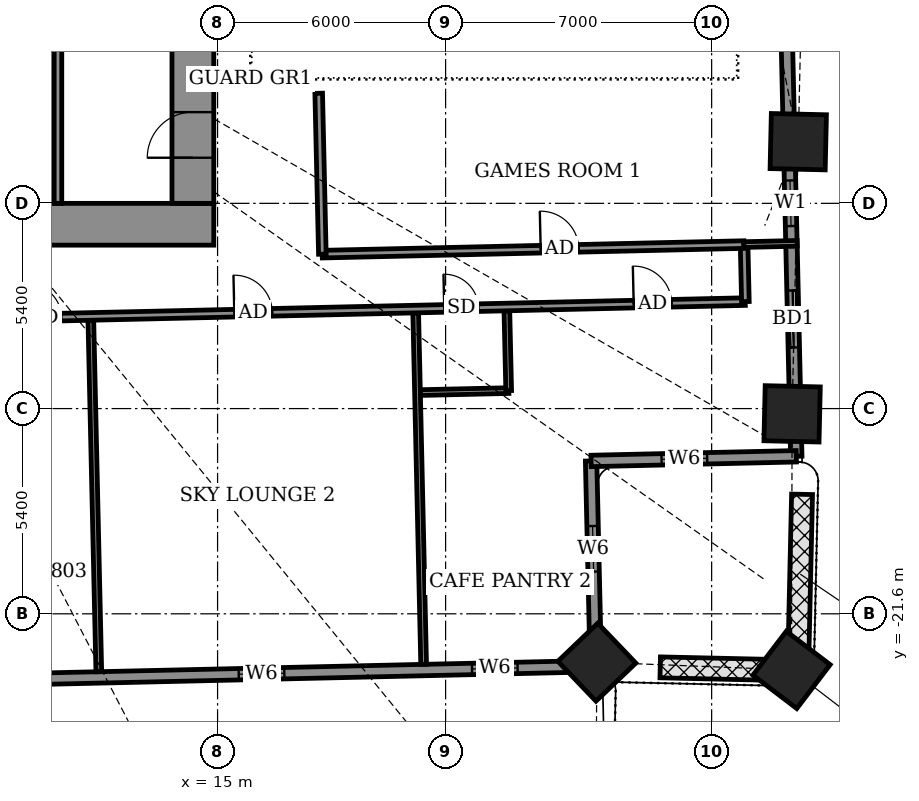
"""IFC4 building model, lengths in metres.
Left out: names, types, materials, properties, quantities, classifications, styles, units other than length and angle.
Written with IfcOpenShell. Run it as: python <this file> out.ifc"""

import sys

from ifc_helpers import new_model, si_unit, direction, frame, frame_2d, origin, origin_2d, place, context, subcontext, project, spatial, rectangle, extrude, element, fill, save


model = new_model("IFC4")
c1 = context("Model", 3, precision=1e-05, world=origin(), true_north=direction((0.0, 1.0)))
c2 = subcontext(c1, "Body", "Model", "MODEL_VIEW")
j1 = project(units=[si_unit("LENGTHUNIT", "METRE"), si_unit("PLANEANGLEUNIT", "RADIAN")], contexts=[c1])
p1 = place(None, origin())
s1 = spatial("IfcSite", under=j1, at=p1, CompositionType="ELEMENT")
p2 = place(p1, origin())
s2 = spatial("IfcBuilding", under=s1, at=p2, CompositionType="ELEMENT")
p3 = place(p2, frame((0.0, 0.0, 74.7)))
s3 = spatial("IfcBuildingStorey", under=s2, at=p3, CompositionType="ELEMENT", Elevation=74.7)
for number, where, z_axis, x_axis in (
    (1, (24.98, -22.873, -0.55), (0.0, 0.0, 1.0), (0.723, 0.691, 0.0)),
    (2, (30.102, -23.076, -0.55), (0.0, 0.0, 1.0), (0.606, 0.796, 0.0)),
    (3, (30.117, -16.339, -0.55), (0.0, 0.0, 1.0), (0.023, 1.0, 0.0)),
    (4, (30.279, -9.177, -0.55), (0.0, 0.0, 1.0), (0.023, 1.0, 0.0)),
):
    element("IfcColumn", number, at=place(p3, frame(where, z_axis=z_axis, x_axis=x_axis)), inside=s3, PredefinedType="COLUMN", context=c2, shape_type="SweptSolid", body=[
        extrude(rectangle(XDim=1.45, YDim=1.45, at=origin_2d()), origin(), (0.0, 0.0, 1.0), 4.6),
    ])
p4 = place(p3, frame((30.227, -17.455, 0.0), z_axis=(0.0, 0.0, 1.0), x_axis=(-0.022734702163, 0.999741533256, 0.0)))
e5 = element("IfcWall", 5, at=p4, inside=s3, PredefinedType="SOLIDWALL", context=c2, shape_type="SweptSolid", body=[
    extrude(rectangle(XDim=12.929, YDim=0.3, at=frame_2d((6.465, 0.0))), origin(), (0.0, 0.0, 1.0), 2.45),
])
p5 = place(p4, frame((2.863, 0.0, 0.0)))
e6 = element("IfcOpeningElement", 6, at=p5, cuts=e5, PredefinedType="OPENING", context=c2, shape_type="SweptSolid", body=[
    extrude(rectangle(XDim=1.5, YDim=2.4, at=frame_2d((0.75, 1.2))), frame((0.0, 0.16, 0.0), z_axis=(0.0, -1.0, 0.0), x_axis=(1.0, 0.0, 0.0)), (0.0, 0.0, 1.0), 0.32),
])
p6 = place(p4, frame((6.059, 0.0, 0.9)))
e7 = element("IfcOpeningElement", 7, at=p6, cuts=e5, PredefinedType="OPENING", context=c2, shape_type="SweptSolid", body=[
    extrude(rectangle(XDim=1.2, YDim=1.5, at=frame_2d((0.6, 0.75))), frame((0.0, 0.16, 0.0), z_axis=(0.0, -1.0, 0.0), x_axis=(1.0, 0.0, 0.0)), (0.0, 0.0, 1.0), 0.32),
])
p7 = place(p3, frame((-21.409, -24.029, 0.0), z_axis=(0.0, 0.0, 1.0), x_axis=(0.999742634032, 0.022686244721, 0.0)))
e8 = element("IfcWall", 8, at=p7, inside=s3, PredefinedType="SOLIDWALL", context=c2, shape_type="SweptSolid", body=[
    extrude(rectangle(XDim=46.372, YDim=0.3, at=frame_2d((23.186, 0.0))), origin(), (0.0, 0.0, 1.0), 2.1),
])
p8 = place(p7, frame((3.25, 0.0, 0.0)))
e9 = element("IfcOpeningElement", 9, at=p8, cuts=e8, PredefinedType="OPENING", context=c2, shape_type="SweptSolid", body=[
    extrude(rectangle(XDim=1.5, YDim=2.0, at=frame_2d((0.75, 1.0))), frame((0.0, 0.16, 0.0), z_axis=(0.0, -1.0, 0.0), x_axis=(1.0, 0.0, 0.0)), (0.0, 0.0, 1.0), 0.32),
])
p9 = place(p7, frame((10.575, 0.0, 0.5)))
e10 = element("IfcOpeningElement", 10, at=p9, cuts=e8, PredefinedType="OPENING", context=c2, shape_type="SweptSolid", body=[
    extrude(rectangle(XDim=1.2, YDim=1.1, at=frame_2d((0.6, 0.55))), frame((0.0, 0.16, 0.0), z_axis=(0.0, -1.0, 0.0), x_axis=(1.0, 0.0, 0.0)), (0.0, 0.0, 1.0), 0.32),
])
p10 = place(p7, frame((15.95, 0.0, 0.5)))
e11 = element("IfcOpeningElement", 11, at=p10, cuts=e8, PredefinedType="OPENING", context=c2, shape_type="SweptSolid", body=[
    extrude(rectangle(XDim=1.2, YDim=1.1, at=frame_2d((0.6, 0.55))), frame((0.0, 0.16, 0.0), z_axis=(0.0, -1.0, 0.0), x_axis=(1.0, 0.0, 0.0)), (0.0, 0.0, 1.0), 0.32),
])
p11 = place(p7, frame((20.575, 0.0, 0.0)))
e12 = element("IfcOpeningElement", 12, at=p11, cuts=e8, PredefinedType="OPENING", context=c2, shape_type="SweptSolid", body=[
    extrude(rectangle(XDim=1.5, YDim=2.0, at=frame_2d((0.75, 1.0))), frame((0.0, 0.16, 0.0), z_axis=(0.0, -1.0, 0.0), x_axis=(1.0, 0.0, 0.0)), (0.0, 0.0, 1.0), 0.32),
])
p12 = place(p7, frame((25.35, 0.0, 0.0)))
e13 = element("IfcOpeningElement", 13, at=p12, cuts=e8, PredefinedType="OPENING", context=c2, shape_type="SweptSolid", body=[
    extrude(rectangle(XDim=1.5, YDim=2.0, at=frame_2d((0.75, 1.0))), frame((0.0, 0.16, 0.0), z_axis=(0.0, -1.0, 0.0), x_axis=(1.0, 0.0, 0.0)), (0.0, 0.0, 1.0), 0.32),
])
p13 = place(p7, frame((30.125, 0.0, 0.0)))
e14 = element("IfcOpeningElement", 14, at=p13, cuts=e8, PredefinedType="OPENING", context=c2, shape_type="SweptSolid", body=[
    extrude(rectangle(XDim=1.5, YDim=2.0, at=frame_2d((0.75, 1.0))), frame((0.0, 0.16, 0.0), z_axis=(0.0, -1.0, 0.0), x_axis=(1.0, 0.0, 0.0)), (0.0, 0.0, 1.0), 0.32),
])
p14 = place(p7, frame((36.975, 0.0, 0.5)))
e15 = element("IfcOpeningElement", 15, at=p14, cuts=e8, PredefinedType="OPENING", context=c2, shape_type="SweptSolid", body=[
    extrude(rectangle(XDim=1.2, YDim=1.1, at=frame_2d((0.6, 0.55))), frame((0.0, 0.16, 0.0), z_axis=(0.0, -1.0, 0.0), x_axis=(1.0, 0.0, 0.0)), (0.0, 0.0, 1.0), 0.32),
])
p15 = place(p7, frame((43.115, 0.0, 0.5)))
e16 = element("IfcOpeningElement", 16, at=p15, cuts=e8, PredefinedType="OPENING", context=c2, shape_type="SweptSolid", body=[
    extrude(rectangle(XDim=1.2, YDim=1.1, at=frame_2d((0.6, 0.55))), frame((0.0, 0.16, 0.0), z_axis=(0.0, -1.0, 0.0), x_axis=(1.0, 0.0, 0.0)), (0.0, 0.0, 1.0), 0.32),
])
p16 = place(p3, frame((24.951, -22.977, 0.0), z_axis=(0.0, 0.0, 1.0), x_axis=(-0.022784045517, 0.999740409941, 0.0)))
e17 = element("IfcWall", 17, at=p16, inside=s3, PredefinedType="SOLIDWALL", context=c2, shape_type="SweptSolid", body=[
    extrude(rectangle(XDim=5.401, YDim=0.3, at=frame_2d((2.7, 0.0))), origin(), (0.0, 0.0, 1.0), 2.25),
])
p17 = place(p16, frame((2.488, 0.0, 0.5)))
e18 = element("IfcOpeningElement", 18, at=p17, cuts=e17, PredefinedType="OPENING", context=c2, shape_type="SweptSolid", body=[
    extrude(rectangle(XDim=1.2, YDim=1.1, at=frame_2d((0.6, 0.55))), frame((0.0, 0.16, 0.0), z_axis=(0.0, -1.0, 0.0), x_axis=(1.0, 0.0, 0.0)), (0.0, 0.0, 1.0), 0.32),
])
p18 = place(p3, frame((24.828, -17.578, 0.0), z_axis=(0.0, 0.0, 1.0), x_axis=(0.99974143864, 0.022738862475, 0.0)))
e19 = element("IfcWall", 19, at=p18, inside=s3, PredefinedType="SOLIDWALL", context=c2, shape_type="SweptSolid", body=[
    extrude(rectangle(XDim=5.401, YDim=0.3, at=frame_2d((2.7, 0.0))), origin(), (0.0, 0.0, 1.0), 2.25),
])
p19 = place(p18, frame((1.855, 0.0, 0.5)))
e20 = element("IfcOpeningElement", 20, at=p19, cuts=e19, PredefinedType="OPENING", context=c2, shape_type="SweptSolid", body=[
    extrude(rectangle(XDim=1.2, YDim=1.1, at=frame_2d((0.6, 0.55))), frame((0.0, 0.16, 0.0), z_axis=(0.0, -1.0, 0.0), x_axis=(1.0, 0.0, 0.0)), (0.0, 0.0, 1.0), 0.32),
])
p20 = place(p3, frame((30.379, -18.456, 0.0), z_axis=(0.0, 0.0, 1.0), x_axis=(-0.02260655623, -0.999744439152, 0.0)))
e21 = element("IfcWall", 21, at=p20, inside=s3, PredefinedType="USERDEFINED", context=c2, shape_type="SweptSolid", body=[
    extrude(rectangle(XDim=4.201, YDim=0.55, at=frame_2d((2.101, 0.0))), origin(), (0.0, 0.0, 1.0), 0.8),
])
p21 = place(p3, frame((29.839, -23.081, 0.0), z_axis=(0.0, 0.0, 1.0), x_axis=(-0.999745572019, 0.022556401051, 0.0)))
e22 = element("IfcWall", 22, at=p21, inside=s3, PredefinedType="USERDEFINED", context=c2, shape_type="SweptSolid", body=[
    extrude(rectangle(XDim=3.193, YDim=0.55, at=frame_2d((1.596, 0.0))), origin(), (0.0, 0.0, 1.0), 0.8),
])
p22 = place(p3, frame((11.875, -23.124, 0.0), z_axis=(0.0, 0.0, 1.0), x_axis=(-0.022697424684, 0.999742380272, 0.0)))
e23 = element("IfcWall", 23, at=p22, inside=s3, PredefinedType="PARTITIONING", context=c2, shape_type="SweptSolid", body=[
    extrude(rectangle(XDim=9.25, YDim=0.15, at=frame_2d((4.625, 0.0))), origin(), (0.0, 0.0, 1.0), 2.1),
])
p23 = place(p3, frame((20.422, -22.93, 0.0), z_axis=(0.0, 0.0, 1.0), x_axis=(-0.022618288198, 0.999744173796, 0.0)))
e24 = element("IfcWall", 24, at=p23, inside=s3, PredefinedType="PARTITIONING", context=c2, shape_type="SweptSolid", body=[
    extrude(rectangle(XDim=9.25, YDim=0.15, at=frame_2d((4.625, 0.0))), origin(), (0.0, 0.0, 1.0), 2.25),
])
p24 = place(p3, frame((20.339, -15.779, 0.0), z_axis=(0.0, 0.0, 1.0), x_axis=(0.999749954681, 0.022361308448, 0.0)))
e25 = element("IfcWall", 25, at=p24, inside=s3, PredefinedType="PARTITIONING", context=c2, shape_type="SweptSolid", body=[
    extrude(rectangle(XDim=2.325, YDim=0.15, at=frame_2d((1.163, 0.0))), origin(), (0.0, 0.0, 1.0), 2.25),
])
p25 = place(p3, frame((22.66, -15.727, 0.0), z_axis=(0.0, 0.0, 1.0), x_axis=(-0.022779486249, 0.999740513837, 0.0)))
e26 = element("IfcWall", 26, at=p25, inside=s3, PredefinedType="PARTITIONING", context=c2, shape_type="SweptSolid", body=[
    extrude(rectangle(XDim=2.101, YDim=0.15, at=frame_2d((1.05, 0.0))), origin(), (0.0, 0.0, 1.0), 2.25),
])
p26 = place(p3, frame((-24.88, -14.605, 0.0), z_axis=(0.0, 0.0, 1.0), x_axis=(0.999742652859, 0.022685415006, 0.0)))
e27 = element("IfcWall", 27, at=p26, inside=s3, PredefinedType="PARTITIONING", context=c2, shape_type="SweptSolid", body=[
    extrude(rectangle(XDim=53.778, YDim=0.2, at=frame_2d((26.889, 0.0))), origin(), (0.0, 0.0, 1.0), 2.1),
])
p27 = place(p26, frame((3.256, 0.0, 0.0)))
e28 = element("IfcOpeningElement", 28, at=p27, cuts=e27, PredefinedType="OPENING", context=c2, shape_type="SweptSolid", body=[
    extrude(rectangle(XDim=1.0, YDim=2.1, at=frame_2d((0.5, 1.05))), frame((0.0, 0.11, 0.0), z_axis=(0.0, -1.0, 0.0), x_axis=(1.0, 0.0, 0.0)), (0.0, 0.0, 1.0), 0.22),
])
p28 = place(p26, frame((9.756, 0.0, 0.0)))
e29 = element("IfcOpeningElement", 29, at=p28, cuts=e27, PredefinedType="OPENING", context=c2, shape_type="SweptSolid", body=[
    extrude(rectangle(XDim=0.9, YDim=2.1, at=frame_2d((0.45, 1.05))), frame((0.0, 0.11, 0.0), z_axis=(0.0, -1.0, 0.0), x_axis=(1.0, 0.0, 0.0)), (0.0, 0.0, 1.0), 0.22),
])
p29 = place(p26, frame((15.131, 0.0, 0.0)))
e30 = element("IfcOpeningElement", 30, at=p29, cuts=e27, PredefinedType="OPENING", context=c2, shape_type="SweptSolid", body=[
    extrude(rectangle(XDim=1.0, YDim=2.1, at=frame_2d((0.5, 1.05))), frame((0.0, 0.11, 0.0), z_axis=(0.0, -1.0, 0.0), x_axis=(1.0, 0.0, 0.0)), (0.0, 0.0, 1.0), 0.22),
])
p30 = place(p26, frame((12.156, 0.0, 0.0)))
e31 = element("IfcOpeningElement", 31, at=p30, cuts=e27, PredefinedType="OPENING", context=c2, shape_type="SweptSolid", body=[
    extrude(rectangle(XDim=0.9, YDim=2.1, at=frame_2d((0.45, 1.05))), frame((0.0, 0.11, 0.0), z_axis=(0.0, -1.0, 0.0), x_axis=(1.0, 0.0, 0.0)), (0.0, 0.0, 1.0), 0.22),
])
p31 = place(p26, frame((18.006, 0.0, 0.0)))
e32 = element("IfcOpeningElement", 32, at=p31, cuts=e27, PredefinedType="OPENING", context=c2, shape_type="SweptSolid", body=[
    extrude(rectangle(XDim=1.0, YDim=2.1, at=frame_2d((0.5, 1.05))), frame((0.0, 0.11, 0.0), z_axis=(0.0, -1.0, 0.0), x_axis=(1.0, 0.0, 0.0)), (0.0, 0.0, 1.0), 0.22),
])
p32 = place(p26, frame((20.406, 0.0, 0.0)))
e33 = element("IfcOpeningElement", 33, at=p32, cuts=e27, PredefinedType="OPENING", context=c2, shape_type="SweptSolid", body=[
    extrude(rectangle(XDim=0.9, YDim=2.1, at=frame_2d((0.45, 1.05))), frame((0.0, 0.11, 0.0), z_axis=(0.0, -1.0, 0.0), x_axis=(1.0, 0.0, 0.0)), (0.0, 0.0, 1.0), 0.22),
])
p33 = place(p26, frame((25.331, 0.0, 0.0)))
e34 = element("IfcOpeningElement", 34, at=p33, cuts=e27, PredefinedType="OPENING", context=c2, shape_type="SweptSolid", body=[
    extrude(rectangle(XDim=0.9, YDim=2.1, at=frame_2d((0.45, 1.05))), frame((0.0, 0.11, 0.0), z_axis=(0.0, -1.0, 0.0), x_axis=(1.0, 0.0, 0.0)), (0.0, 0.0, 1.0), 0.22),
])
p34 = place(p26, frame((27.706, 0.0, 0.0)))
e35 = element("IfcOpeningElement", 35, at=p34, cuts=e27, PredefinedType="OPENING", context=c2, shape_type="SweptSolid", body=[
    extrude(rectangle(XDim=0.9, YDim=2.1, at=frame_2d((0.45, 1.05))), frame((0.0, 0.11, 0.0), z_axis=(0.0, -1.0, 0.0), x_axis=(1.0, 0.0, 0.0)), (0.0, 0.0, 1.0), 0.22),
])
p35 = place(p26, frame((34.881, 0.0, 0.0)))
e36 = element("IfcOpeningElement", 36, at=p35, cuts=e27, PredefinedType="OPENING", context=c2, shape_type="SweptSolid", body=[
    extrude(rectangle(XDim=0.9, YDim=2.1, at=frame_2d((0.45, 1.05))), frame((0.0, 0.11, 0.0), z_axis=(0.0, -1.0, 0.0), x_axis=(1.0, 0.0, 0.0)), (0.0, 0.0, 1.0), 0.22),
])
p36 = place(p26, frame((40.331, 0.0, 0.0)))
e37 = element("IfcOpeningElement", 37, at=p36, cuts=e27, PredefinedType="OPENING", context=c2, shape_type="SweptSolid", body=[
    extrude(rectangle(XDim=1.0, YDim=2.1, at=frame_2d((0.5, 1.05))), frame((0.0, 0.11, 0.0), z_axis=(0.0, -1.0, 0.0), x_axis=(1.0, 0.0, 0.0)), (0.0, 0.0, 1.0), 0.22),
])
p37 = place(p26, frame((50.842, 0.0, 0.0)))
e38 = element("IfcOpeningElement", 38, at=p37, cuts=e27, PredefinedType="OPENING", context=c2, shape_type="SweptSolid", body=[
    extrude(rectangle(XDim=1.0, YDim=2.1, at=frame_2d((0.5, 1.05))), frame((0.0, 0.11, 0.0), z_axis=(0.0, -1.0, 0.0), x_axis=(1.0, 0.0, 0.0)), (0.0, 0.0, 1.0), 0.22),
])
p38 = place(p26, frame((45.856, 0.0, 0.0)))
e39 = element("IfcOpeningElement", 39, at=p38, cuts=e27, PredefinedType="OPENING", context=c2, shape_type="SweptSolid", body=[
    extrude(rectangle(XDim=0.9, YDim=2.1, at=frame_2d((0.45, 1.05))), frame((0.0, 0.11, 0.0), z_axis=(0.0, -1.0, 0.0), x_axis=(1.0, 0.0, 0.0)), (0.0, 0.0, 1.0), 0.22),
])
p39 = place(p3, frame((28.888, -13.385, 0.0), z_axis=(0.0, 0.0, 1.0), x_axis=(-0.022617910375, 0.999744182344, 0.0)))
e40 = element("IfcWall", 40, at=p39, inside=s3, PredefinedType="PARTITIONING", context=c2, shape_type="SweptSolid", body=[
    extrude(rectangle(XDim=1.5, YDim=0.2, at=frame_2d((0.75, 0.0))), origin(), (0.0, 0.0, 1.0), 4.05),
])
p40 = place(p3, frame((17.753, -12.137, 0.0), z_axis=(0.0, 0.0, 1.0), x_axis=(0.99974235761, 0.022698422868, 0.0)))
e41 = element("IfcWall", 41, at=p40, inside=s3, PredefinedType="PARTITIONING", context=c2, shape_type="SweptSolid", body=[
    extrude(rectangle(XDim=11.1, YDim=0.2, at=frame_2d((5.55, 0.0))), origin(), (0.0, 0.0, 1.0), 2.25),
])
p41 = place(p40, frame((5.75, 0.0, 0.0)))
e42 = element("IfcOpeningElement", 42, at=p41, cuts=e41, PredefinedType="OPENING", context=c2, shape_type="SweptSolid", body=[
    extrude(rectangle(XDim=1.0, YDim=2.1, at=frame_2d((0.5, 1.05))), frame((0.0, 0.11, 0.0), z_axis=(0.0, -1.0, 0.0), x_axis=(1.0, 0.0, 0.0)), (0.0, 0.0, 1.0), 0.22),
])
p42 = place(p3, frame((17.757, -12.137, 0.0), z_axis=(0.0, 0.0, 1.0), x_axis=(-0.022718785711, 0.999741895079, 0.0)))
e43 = element("IfcWall", 43, at=p42, inside=s3, PredefinedType="PARTITIONING", context=c2, shape_type="SweptSolid", body=[
    extrude(rectangle(XDim=4.234, YDim=0.2, at=frame_2d((2.117, 0.0))), origin(), (0.0, 0.0, 1.0), 2.25),
])
p43 = place(p3, frame((28.846, -11.885, 0.0), z_axis=(0.0, 0.0, 1.0), x_axis=(0.999740667531, 0.022772739949, 0.0)))
e44 = element("IfcWall", 44, at=p43, inside=s3, PredefinedType="PARTITIONING", context=c2, shape_type="SweptSolid", body=[
    extrude(rectangle(XDim=1.404, YDim=0.15, at=frame_2d((0.702, 0.0))), origin(), (0.0, 0.0, 1.0), 2.45),
])
p44 = place(p3, frame((-14.9, -11.35, 0.0), z_axis=(0.0, 0.0, 1.0), x_axis=(1.0, 0.0, 0.0)))
e45 = element("IfcWall", 45, at=p44, inside=s3, PredefinedType="SHEAR", context=c2, shape_type="SweptSolid", body=[
    extrude(rectangle(XDim=29.8, YDim=1.1, at=frame_2d((14.9, 0.0))), origin(), (0.0, 0.0, 1.0), 4.6),
])
p45 = place(p3, frame((14.35, -10.8, 0.0), z_axis=(0.0, 0.0, 1.0), x_axis=(0.0, 1.0, 0.0)))
e46 = element("IfcWall", 46, at=p45, inside=s3, PredefinedType="SHEAR", context=c2, shape_type="SweptSolid", body=[
    extrude(rectangle(XDim=21.6, YDim=1.1, at=frame_2d((10.8, 0.0))), origin(), (0.0, 0.0, 1.0), 4.6),
])
p46 = place(p45, frame((1.2, 0.0, 0.0)))
e47 = element("IfcOpeningElement", 47, at=p46, cuts=e46, PredefinedType="OPENING", context=c2, shape_type="SweptSolid", body=[
    extrude(rectangle(XDim=1.2, YDim=2.1, at=frame_2d((0.6, 1.05))), frame((0.0, 0.56, 0.0), z_axis=(0.0, -1.0, 0.0), x_axis=(1.0, 0.0, 0.0)), (0.0, 0.0, 1.0), 1.12),
])
p47 = place(p3, frame((10.8, -10.8, 0.0), z_axis=(0.0, 0.0, 1.0), x_axis=(0.0, 1.0, 0.0)))
e48 = element("IfcWall", 48, at=p47, inside=s3, PredefinedType="SHEAR", context=c2, shape_type="SweptSolid", body=[
    extrude(rectangle(XDim=7.5, YDim=0.2, at=frame_2d((3.75, 0.0))), origin(), (0.0, 0.0, 1.0), 4.05),
])
p48 = place(p5, origin())
e49 = element("IfcDoor", 49, at=p48, inside=s3, OperationType="SLIDING_TO_LEFT", PredefinedType="DOOR", context=c2, shape_type="SweptSolid", body=[
    extrude(rectangle(XDim=1.5, YDim=2.4, at=frame_2d((0.75, 1.2))), frame((0.0, 0.025, 0.0), z_axis=(0.0, -1.0, 0.0), x_axis=(1.0, 0.0, 0.0)), (0.0, 0.0, 1.0), 0.05),
])
fill(e6, e49)
p49 = place(p6, origin())
e50 = element("IfcWindow", 50, at=p49, inside=s3, PartitioningType="SINGLE_PANEL", PredefinedType="WINDOW", context=c2, shape_type="SweptSolid", body=[
    extrude(rectangle(XDim=1.2, YDim=1.5, at=frame_2d((0.6, 0.75))), frame((0.0, 0.03, 0.0), z_axis=(0.0, -1.0, 0.0), x_axis=(1.0, 0.0, 0.0)), (0.0, 0.0, 1.0), 0.06),
])
fill(e7, e50)
p50 = place(p14, origin())
e51 = element("IfcWindow", 51, at=p50, inside=s3, PartitioningType="SINGLE_PANEL", PredefinedType="WINDOW", context=c2, shape_type="SweptSolid", body=[
    extrude(rectangle(XDim=1.2, YDim=1.1, at=frame_2d((0.6, 0.55))), frame((0.0, 0.03, 0.0), z_axis=(0.0, -1.0, 0.0), x_axis=(1.0, 0.0, 0.0)), (0.0, 0.0, 1.0), 0.06),
])
fill(e15, e51)
p51 = place(p15, origin())
e52 = element("IfcWindow", 52, at=p51, inside=s3, PartitioningType="SINGLE_PANEL", PredefinedType="WINDOW", context=c2, shape_type="SweptSolid", body=[
    extrude(rectangle(XDim=1.2, YDim=1.1, at=frame_2d((0.6, 0.55))), frame((0.0, 0.03, 0.0), z_axis=(0.0, -1.0, 0.0), x_axis=(1.0, 0.0, 0.0)), (0.0, 0.0, 1.0), 0.06),
])
fill(e16, e52)
p52 = place(p17, origin())
e53 = element("IfcWindow", 53, at=p52, inside=s3, PartitioningType="SINGLE_PANEL", PredefinedType="WINDOW", context=c2, shape_type="SweptSolid", body=[
    extrude(rectangle(XDim=1.2, YDim=1.1, at=frame_2d((0.6, 0.55))), frame((0.0, 0.03, 0.0), z_axis=(0.0, -1.0, 0.0), x_axis=(1.0, 0.0, 0.0)), (0.0, 0.0, 1.0), 0.06),
])
fill(e18, e53)
p53 = place(p19, origin())
e54 = element("IfcWindow", 54, at=p53, inside=s3, PartitioningType="SINGLE_PANEL", PredefinedType="WINDOW", context=c2, shape_type="SweptSolid", body=[
    extrude(rectangle(XDim=1.2, YDim=1.1, at=frame_2d((0.6, 0.55))), frame((0.0, 0.03, 0.0), z_axis=(0.0, -1.0, 0.0), x_axis=(1.0, 0.0, 0.0)), (0.0, 0.0, 1.0), 0.06),
])
fill(e20, e54)
p54 = place(p35, origin())
e55 = element("IfcDoor", 55, at=p54, inside=s3, OperationType="SINGLE_SWING_LEFT", PredefinedType="DOOR", context=c2, shape_type="SweptSolid", body=[
    extrude(rectangle(XDim=0.9, YDim=2.1, at=frame_2d((0.45, 1.05))), frame((0.0, 0.025, 0.0), z_axis=(0.0, -1.0, 0.0), x_axis=(1.0, 0.0, 0.0)), (0.0, 0.0, 1.0), 0.05),
])
fill(e36, e55)
p55 = place(p36, origin())
e56 = element("IfcDoor", 56, at=p55, inside=s3, OperationType="SINGLE_SWING_RIGHT", PredefinedType="DOOR", context=c2, shape_type="SweptSolid", body=[
    extrude(rectangle(XDim=1.0, YDim=2.1, at=frame_2d((0.5, 1.05))), frame((0.0, 0.025, 0.0), z_axis=(0.0, -1.0, 0.0), x_axis=(1.0, 0.0, 0.0)), (0.0, 0.0, 1.0), 0.05),
])
fill(e37, e56)
p56 = place(p37, origin())
e57 = element("IfcDoor", 57, at=p56, inside=s3, OperationType="SINGLE_SWING_LEFT", PredefinedType="DOOR", context=c2, shape_type="SweptSolid", body=[
    extrude(rectangle(XDim=1.0, YDim=2.1, at=frame_2d((0.5, 1.05))), frame((0.0, 0.025, 0.0), z_axis=(0.0, -1.0, 0.0), x_axis=(1.0, 0.0, 0.0)), (0.0, 0.0, 1.0), 0.05),
])
fill(e38, e57)
p57 = place(p38, origin())
e58 = element("IfcDoor", 58, at=p57, inside=s3, OperationType="SINGLE_SWING_RIGHT", PredefinedType="DOOR", context=c2, shape_type="SweptSolid", body=[
    extrude(rectangle(XDim=0.9, YDim=2.1, at=frame_2d((0.45, 1.05))), frame((0.0, 0.025, 0.0), z_axis=(0.0, -1.0, 0.0), x_axis=(1.0, 0.0, 0.0)), (0.0, 0.0, 1.0), 0.05),
])
fill(e39, e58)
p58 = place(p41, origin())
e59 = element("IfcDoor", 59, at=p58, inside=s3, OperationType="SINGLE_SWING_RIGHT", PredefinedType="DOOR", context=c2, shape_type="SweptSolid", body=[
    extrude(rectangle(XDim=1.0, YDim=2.1, at=frame_2d((0.5, 1.05))), frame((0.0, 0.025, 0.0), z_axis=(0.0, -1.0, 0.0), x_axis=(1.0, 0.0, 0.0)), (0.0, 0.0, 1.0), 0.05),
])
fill(e42, e59)
p59 = place(p46, origin())
e60 = element("IfcDoor", 60, at=p59, inside=s3, OperationType="DOUBLE_DOOR_SINGLE_SWING", PredefinedType="DOOR", context=c2, shape_type="SweptSolid", body=[
    extrude(rectangle(XDim=1.2, YDim=2.1, at=frame_2d((0.6, 1.05))), frame((0.0, 0.025, 0.0), z_axis=(0.0, -1.0, 0.0), x_axis=(1.0, 0.0, 0.0)), (0.0, 0.0, 1.0), 0.05),
])
fill(e47, e60)
save(model, sys.argv[1])
